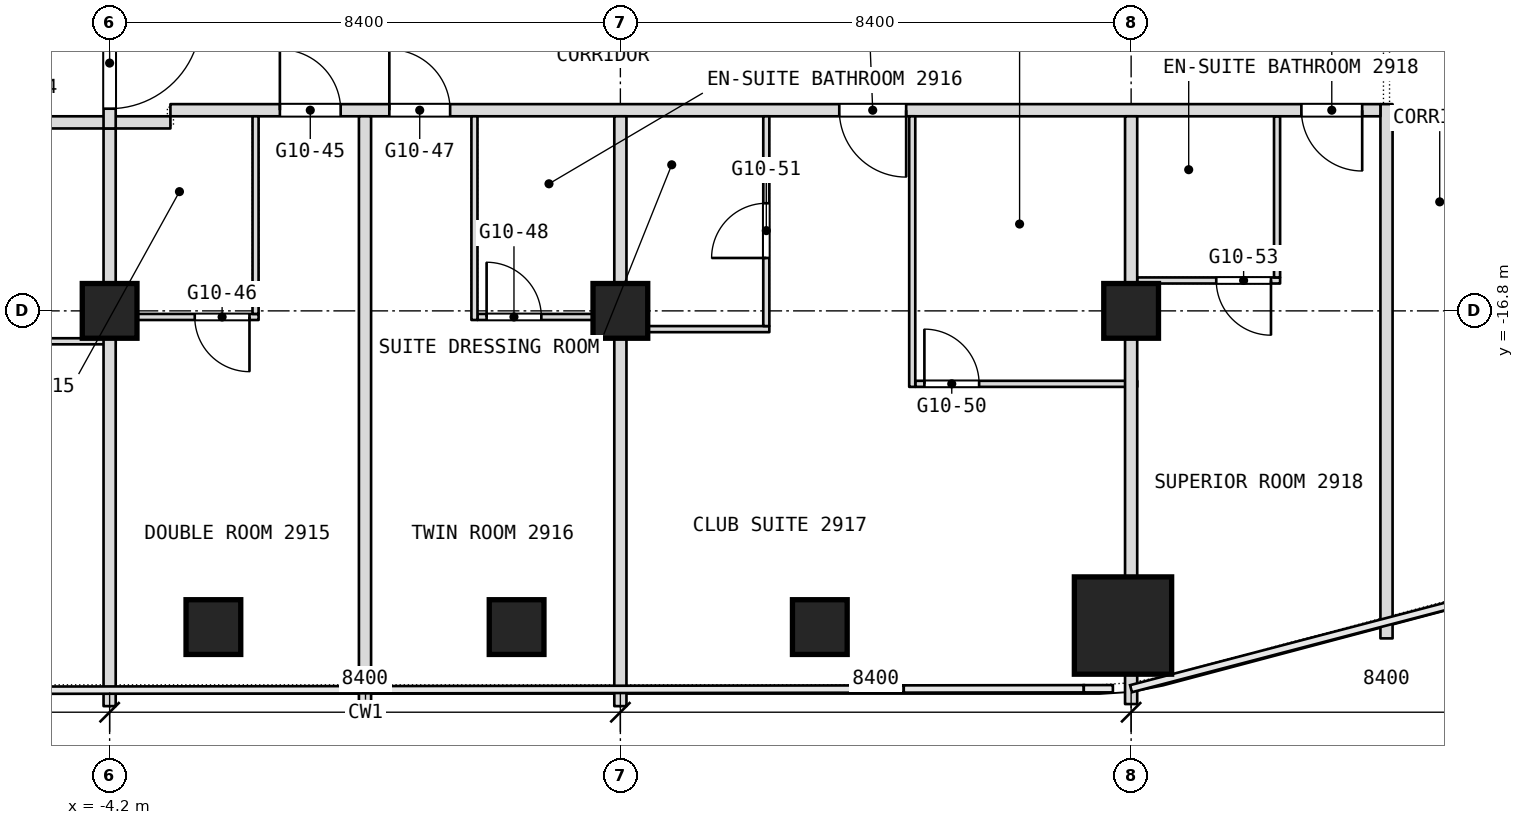
"""IFC4 building model, lengths in metres.
Left out: names, types, materials, properties, quantities, classifications, styles, units other than length and angle.
Written with IfcOpenShell. Run it as: python <this file> out.ifc"""

import sys

from ifc_helpers import new_model, si_unit, direction, frame, frame_2d, origin, origin_2d, place, context, subcontext, project, spatial, rectangle, extrude, element, fill, save


model = new_model("IFC4")
c1 = context("Model", 3, precision=1e-05, world=origin(), true_north=direction((0.0, 1.0)))
c2 = subcontext(c1, "Body", "Model", "MODEL_VIEW")
j1 = project(units=[si_unit("LENGTHUNIT", "METRE"), si_unit("PLANEANGLEUNIT", "RADIAN")], contexts=[c1])
p1 = place(None, origin())
s1 = spatial("IfcSite", under=j1, at=p1, CompositionType="ELEMENT")
p2 = place(p1, origin())
s2 = spatial("IfcBuilding", under=s1, at=p2, CompositionType="ELEMENT")
p3 = place(p2, frame((0.0, 0.0, 130.1)))
s3 = spatial("IfcBuildingStorey", under=s2, at=p3, CompositionType="ELEMENT", Elevation=130.1)
p4 = place(p3, frame((12.466, -21.975, 0.0), z_axis=(0.0, 0.0, 1.0), x_axis=(1.0, 0.0, 0.0)))
e1 = element("IfcColumn", 1, at=p4, inside=s3, PredefinedType="COLUMN", context=c2, shape_type="SweptSolid", body=[
    extrude(rectangle(XDim=1.6, YDim=1.6, at=origin_2d()), origin(), (0.0, 0.0, 1.0), 3.6),
])
for number, where, z_axis, x_axis in (
    (2, (-4.2, -16.8, 0.0), (0.0, 0.0, 1.0), (1.0, 0.0, 0.0)),
    (3, (4.2, -16.8, 0.0), (0.0, 0.0, 1.0), (1.0, 0.0, 0.0)),
    (4, (12.6, -16.8, 0.0), (0.0, 0.0, 1.0), (1.0, 0.0, 0.0)),
    (5, (7.48, -22.0, 0.0), (0.0, 0.0, 1.0), (1.0, 0.0, 0.0)),
    (6, (2.493, -22.0, 0.0), (0.0, 0.0, 1.0), (1.0, 0.0, 0.0)),
    (7, (-2.493, -22.0, 0.0), (0.0, 0.0, 1.0), (1.0, 0.0, 0.0)),
):
    element("IfcColumn", number, at=place(p3, frame(where, z_axis=z_axis, x_axis=x_axis)), inside=s3, PredefinedType="COLUMN", context=c2, shape_type="SweptSolid", body=[
        extrude(rectangle(XDim=0.9, YDim=0.9, at=origin_2d()), origin(), (0.0, 0.0, 1.0), 3.6),
    ])
p5 = place(p3, frame((9.05, -18.0, 0.0), z_axis=(0.0, 0.0, 1.0), x_axis=(1.0, 0.0, 0.0)))
e8 = element("IfcWall", 8, at=p5, inside=s3, PredefinedType="PARTITIONING", context=c2, shape_type="SweptSolid", body=[
    extrude(rectangle(XDim=3.65, YDim=0.1, at=frame_2d((1.825, 0.0))), origin(), (0.0, 0.0, 1.0), 3.34),
])
p6 = place(p5, frame((0.15, 0.0, 0.0)))
e9 = element("IfcOpeningElement", 9, at=p6, cuts=e8, PredefinedType="OPENING", context=c2, shape_type="SweptSolid", body=[
    extrude(rectangle(XDim=0.9, YDim=2.1, at=frame_2d((0.45, 1.05))), frame((0.0, 0.05, 0.0), z_axis=(0.0, -1.0, 0.0), x_axis=(1.0, 0.0, 0.0)), (0.0, 0.0, 1.0), 0.1),
])
p7 = place(p3, frame((-7.75, -17.3, 0.0), z_axis=(0.0, 0.0, 1.0), x_axis=(1.0, 0.0, 0.0)))
e10 = element("IfcWall", 10, at=p7, inside=s3, PredefinedType="PARTITIONING", context=c2, shape_type="SweptSolid", body=[
    extrude(rectangle(XDim=3.65, YDim=0.1, at=frame_2d((1.825, 0.0))), origin(), (0.0, 0.0, 1.0), 3.34),
])
p8 = place(p7, frame((0.15, 0.0, 0.0)))
e11 = element("IfcOpeningElement", 11, at=p8, cuts=e10, PredefinedType="OPENING", context=c2, shape_type="SweptSolid", body=[
    extrude(rectangle(XDim=0.9, YDim=2.1, at=frame_2d((0.45, 1.05))), frame((0.0, 0.05, 0.0), z_axis=(0.0, -1.0, 0.0), x_axis=(1.0, 0.0, 0.0)), (0.0, 0.0, 1.0), 0.1),
])
p9 = place(p3, frame((4.3, -17.1, 0.0), z_axis=(0.0, 0.0, 1.0), x_axis=(1.0, 0.0, 0.0)))
e12 = element("IfcWall", 12, at=p9, inside=s3, PredefinedType="PARTITIONING", context=c2, shape_type="SweptSolid", body=[
    extrude(rectangle(XDim=2.35, YDim=0.1, at=frame_2d((1.175, 0.0))), origin(), (0.0, 0.0, 1.0), 3.34),
])
p10 = place(p3, frame((-4.1, -16.9, 0.0), z_axis=(0.0, 0.0, 1.0), x_axis=(1.0, 0.0, 0.0)))
e13 = element("IfcWall", 13, at=p10, inside=s3, PredefinedType="PARTITIONING", context=c2, shape_type="SweptSolid", body=[
    extrude(rectangle(XDim=2.35, YDim=0.1, at=frame_2d((1.175, 0.0))), origin(), (0.0, 0.0, 1.0), 2.89),
])
p11 = place(p10, frame((1.3, 0.0, 0.0)))
e14 = element("IfcOpeningElement", 14, at=p11, cuts=e13, PredefinedType="OPENING", context=c2, shape_type="SweptSolid", body=[
    extrude(rectangle(XDim=0.9, YDim=2.1, at=frame_2d((0.45, 1.05))), frame((0.0, 0.05, 0.0), z_axis=(0.0, -1.0, 0.0), x_axis=(1.0, 0.0, 0.0)), (0.0, 0.0, 1.0), 0.1),
])
p12 = place(p3, frame((1.85, -16.9, 0.0), z_axis=(0.0, 0.0, 1.0), x_axis=(1.0, 0.0, 0.0)))
e15 = element("IfcWall", 15, at=p12, inside=s3, PredefinedType="PARTITIONING", context=c2, shape_type="SweptSolid", body=[
    extrude(rectangle(XDim=2.45, YDim=0.1, at=frame_2d((1.225, 0.0))), origin(), (0.0, 0.0, 1.0), 2.89),
])
p13 = place(p12, frame((0.15, 0.0, 0.0)))
e16 = element("IfcOpeningElement", 16, at=p13, cuts=e15, PredefinedType="OPENING", context=c2, shape_type="SweptSolid", body=[
    extrude(rectangle(XDim=0.9, YDim=2.1, at=frame_2d((0.45, 1.05))), frame((0.0, 0.05, 0.0), z_axis=(0.0, -1.0, 0.0), x_axis=(1.0, 0.0, 0.0)), (0.0, 0.0, 1.0), 0.1),
])
p14 = place(p3, frame((16.8, -22.186, 0.0), z_axis=(0.0, 0.0, 1.0), x_axis=(0.0, 1.0, 0.0)))
e17 = element("IfcWall", 17, at=p14, inside=s3, PredefinedType="PARTITIONING", context=c2, shape_type="SweptSolid", body=[
    extrude(rectangle(XDim=8.786, YDim=0.2, at=frame_2d((4.393, 0.0))), origin(), (0.0, 0.0, 1.0), 3.34),
])
p15 = place(p3, frame((12.7, -16.3, 0.0), z_axis=(0.0, 0.0, 1.0), x_axis=(1.0, 0.0, 0.0)))
e18 = element("IfcWall", 18, at=p15, inside=s3, PredefinedType="PARTITIONING", context=c2, shape_type="SweptSolid", body=[
    extrude(rectangle(XDim=2.35, YDim=0.1, at=frame_2d((1.175, 0.0))), origin(), (0.0, 0.0, 1.0), 3.34),
])
p16 = place(p15, frame((1.3, 0.0, 0.0)))
e19 = element("IfcOpeningElement", 19, at=p16, cuts=e18, PredefinedType="OPENING", context=c2, shape_type="SweptSolid", body=[
    extrude(rectangle(XDim=0.9, YDim=2.1, at=frame_2d((0.45, 1.05))), frame((0.0, 0.05, 0.0), z_axis=(0.0, -1.0, 0.0), x_axis=(1.0, 0.0, 0.0)), (0.0, 0.0, 1.0), 0.1),
])
p17 = place(p3, frame((15.0, -16.25, 0.0), z_axis=(0.0, 0.0, 1.0), x_axis=(0.0, 1.0, 0.0)))
e20 = element("IfcWall", 20, at=p17, inside=s3, PredefinedType="PARTITIONING", context=c2, shape_type="SweptSolid", body=[
    extrude(rectangle(XDim=2.65, YDim=0.1, at=frame_2d((1.325, 0.0))), origin(), (0.0, 0.0, 1.0), 3.34),
])
p18 = place(p3, frame((-12.4, -13.7, 0.0), z_axis=(0.0, 0.0, 1.0), x_axis=(1.0, 0.0, 0.0)))
e21 = element("IfcWall", 21, at=p18, inside=s3, PredefinedType="PARTITIONING", context=c2, shape_type="SweptSolid", body=[
    extrude(rectangle(XDim=9.2, YDim=0.2, at=frame_2d((4.6, 0.0))), origin(), (0.0, 0.0, 1.0), 3.34),
])
p19 = place(p18, frame((3.4, 0.0, 0.0)))
e22 = element("IfcOpeningElement", 22, at=p19, cuts=e21, PredefinedType="OPENING", context=c2, shape_type="SweptSolid", body=[
    extrude(rectangle(XDim=1.1, YDim=2.1, at=frame_2d((0.55, 1.05))), frame((0.0, 0.1, 0.0), z_axis=(0.0, -1.0, 0.0), x_axis=(1.0, 0.0, 0.0)), (0.0, 0.0, 1.0), 0.2),
])
p20 = place(p3, frame((-3.2, -13.5, 0.0), z_axis=(0.0, 0.0, 1.0), x_axis=(1.0, 0.0, 0.0)))
e23 = element("IfcWall", 23, at=p20, inside=s3, PredefinedType="PARTITIONING", context=c2, shape_type="SweptSolid", body=[
    extrude(rectangle(XDim=19.9, YDim=0.2, at=frame_2d((9.95, 0.0))), origin(), (0.0, 0.0, 1.0), 3.34),
])
p21 = place(p20, frame((1.8, 0.0, 0.0)))
e24 = element("IfcOpeningElement", 24, at=p21, cuts=e23, PredefinedType="OPENING", context=c2, shape_type="SweptSolid", body=[
    extrude(rectangle(XDim=1.0, YDim=2.1, at=frame_2d((0.5, 1.05))), frame((0.0, 0.1, 0.0), z_axis=(0.0, -1.0, 0.0), x_axis=(1.0, 0.0, 0.0)), (0.0, 0.0, 1.0), 0.2),
])
p22 = place(p20, frame((3.6, 0.0, 0.0)))
e25 = element("IfcOpeningElement", 25, at=p22, cuts=e23, PredefinedType="OPENING", context=c2, shape_type="SweptSolid", body=[
    extrude(rectangle(XDim=1.0, YDim=2.1, at=frame_2d((0.5, 1.05))), frame((0.0, 0.1, 0.0), z_axis=(0.0, -1.0, 0.0), x_axis=(1.0, 0.0, 0.0)), (0.0, 0.0, 1.0), 0.2),
])
p23 = place(p20, frame((11.0, 0.0, 0.0)))
e26 = element("IfcOpeningElement", 26, at=p23, cuts=e23, PredefinedType="OPENING", context=c2, shape_type="SweptSolid", body=[
    extrude(rectangle(XDim=1.1, YDim=2.1, at=frame_2d((0.55, 1.05))), frame((0.0, 0.1, 0.0), z_axis=(0.0, -1.0, 0.0), x_axis=(1.0, 0.0, 0.0)), (0.0, 0.0, 1.0), 0.2),
])
p24 = place(p20, frame((18.6, 0.0, 0.0)))
e27 = element("IfcOpeningElement", 27, at=p24, cuts=e23, PredefinedType="OPENING", context=c2, shape_type="SweptSolid", body=[
    extrude(rectangle(XDim=1.0, YDim=2.1, at=frame_2d((0.5, 1.05))), frame((0.0, 0.1, 0.0), z_axis=(0.0, -1.0, 0.0), x_axis=(1.0, 0.0, 0.0)), (0.0, 0.0, 1.0), 0.2),
])
p25 = place(p3, frame((12.6, -23.266, 0.0), z_axis=(0.0, 0.0, 1.0), x_axis=(0.0, 1.0, 0.0)))
e28 = element("IfcWall", 28, at=p25, inside=s3, PredefinedType="PARTITIONING", context=c2, shape_type="SweptSolid", body=[
    extrude(rectangle(XDim=0.491, YDim=0.2, at=frame_2d((0.246, 0.0))), origin(), (0.0, 0.0, 1.0), 3.34),
])
p26 = place(p3, frame((12.6, -21.175, 0.0), z_axis=(0.0, 0.0, 1.0), x_axis=(0.0, 1.0, 0.0)))
e29 = element("IfcWall", 29, at=p26, inside=s3, PredefinedType="PARTITIONING", context=c2, shape_type="SweptSolid", body=[
    extrude(rectangle(XDim=7.575, YDim=0.2, at=frame_2d((3.788, 0.0))), origin(), (0.0, 0.0, 1.0), 3.34),
])
p27 = place(p3, frame((9.0, -18.05, 0.0), z_axis=(0.0, 0.0, 1.0), x_axis=(0.0, 1.0, 0.0)))
e30 = element("IfcWall", 30, at=p27, inside=s3, PredefinedType="PARTITIONING", context=c2, shape_type="SweptSolid", body=[
    extrude(rectangle(XDim=4.45, YDim=0.1, at=frame_2d((2.225, 0.0))), origin(), (0.0, 0.0, 1.0), 3.34),
])
p28 = place(p3, frame((6.6, -17.05, 0.0), z_axis=(0.0, 0.0, 1.0), x_axis=(0.0, 1.0, 0.0)))
e31 = element("IfcWall", 31, at=p28, inside=s3, PredefinedType="PARTITIONING", context=c2, shape_type="SweptSolid", body=[
    extrude(rectangle(XDim=3.45, YDim=0.1, at=frame_2d((1.725, 0.0))), origin(), (0.0, 0.0, 1.0), 3.34),
])
p29 = place(p28, frame((1.12, 0.0, 0.0)))
e32 = element("IfcOpeningElement", 32, at=p29, cuts=e31, PredefinedType="OPENING", context=c2, shape_type="SweptSolid", body=[
    extrude(rectangle(XDim=0.9, YDim=2.1, at=frame_2d((0.45, 1.05))), frame((0.0, 0.05, 0.0), z_axis=(0.0, -1.0, 0.0), x_axis=(1.0, 0.0, 0.0)), (0.0, 0.0, 1.0), 0.1),
])
p30 = place(p3, frame((4.2, -23.3, 0.0), z_axis=(0.0, 0.0, 1.0), x_axis=(0.0, 1.0, 0.0)))
e33 = element("IfcWall", 33, at=p30, inside=s3, PredefinedType="PARTITIONING", context=c2, shape_type="SweptSolid", body=[
    extrude(rectangle(XDim=9.7, YDim=0.2, at=frame_2d((4.85, 0.0))), origin(), (0.0, 0.0, 1.0), 3.34),
])
p31 = place(p3, frame((1.8, -16.95, 0.0), z_axis=(0.0, 0.0, 1.0), x_axis=(0.0, 1.0, 0.0)))
e34 = element("IfcWall", 34, at=p31, inside=s3, PredefinedType="PARTITIONING", context=c2, shape_type="SweptSolid", body=[
    extrude(rectangle(XDim=3.35, YDim=0.1, at=frame_2d((1.675, 0.0))), origin(), (0.0, 0.0, 1.0), 3.34),
])
p32 = place(p3, frame((0.0, -23.3, 0.0), z_axis=(0.0, 0.0, 1.0), x_axis=(0.0, 1.0, 0.0)))
e35 = element("IfcWall", 35, at=p32, inside=s3, PredefinedType="PARTITIONING", context=c2, shape_type="SweptSolid", body=[
    extrude(rectangle(XDim=9.7, YDim=0.2, at=frame_2d((4.85, 0.0))), origin(), (0.0, 0.0, 1.0), 3.34),
])
p33 = place(p3, frame((-1.8, -16.85, 0.0), z_axis=(0.0, 0.0, 1.0), x_axis=(0.0, 1.0, 0.0)))
e36 = element("IfcWall", 36, at=p33, inside=s3, PredefinedType="PARTITIONING", context=c2, shape_type="SweptSolid", body=[
    extrude(rectangle(XDim=3.25, YDim=0.1, at=frame_2d((1.625, 0.0))), origin(), (0.0, 0.0, 1.0), 3.34),
])
p34 = place(p3, frame((-4.2, -23.3, 0.0), z_axis=(0.0, 0.0, 1.0), x_axis=(0.0, 1.0, 0.0)))
e37 = element("IfcWall", 37, at=p34, inside=s3, PredefinedType="PARTITIONING", context=c2, shape_type="SweptSolid", body=[
    extrude(rectangle(XDim=9.5, YDim=0.2, at=frame_2d((4.75, 0.0))), origin(), (0.0, 0.0, 1.0), 3.34),
])
p35 = place(p3, frame((-4.2, -13.8, 0.0), z_axis=(0.0, 0.0, 1.0), x_axis=(0.0, 1.0, 0.0)))
e38 = element("IfcWall", 38, at=p35, inside=s3, PredefinedType="PARTITIONING", context=c2, shape_type="SweptSolid", body=[
    extrude(rectangle(XDim=13.8, YDim=0.2, at=frame_2d((6.9, 0.0))), origin(), (0.0, 0.0, 1.0), 3.34),
])
p36 = place(p35, frame((12.15, 0.0, 0.0)))
e39 = element("IfcOpeningElement", 39, at=p36, cuts=e38, PredefinedType="OPENING", context=c2, shape_type="SweptSolid", body=[
    extrude(rectangle(XDim=1.5, YDim=2.1, at=frame_2d((0.75, 1.05))), frame((0.0, 0.1, 0.0), z_axis=(0.0, -1.0, 0.0), x_axis=(1.0, 0.0, 0.0)), (0.0, 0.0, 1.0), 0.2),
])
p37 = place(p35, frame((0.325, 0.0, 0.0)))
e40 = element("IfcOpeningElement", 40, at=p37, cuts=e38, PredefinedType="OPENING", context=c2, shape_type="SweptSolid", body=[
    extrude(rectangle(XDim=1.5, YDim=2.1, at=frame_2d((0.75, 1.05))), frame((0.0, 0.1, 0.0), z_axis=(0.0, -1.0, 0.0), x_axis=(1.0, 0.0, 0.0)), (0.0, 0.0, 1.0), 0.2),
])
p38 = place(p6, origin())
e41 = element("IfcDoor", 41, at=p38, inside=s3, OperationType="SINGLE_SWING_LEFT", PredefinedType="DOOR", context=c2, shape_type="SweptSolid", body=[
    extrude(rectangle(XDim=0.9, YDim=2.1, at=frame_2d((0.45, 1.05))), frame((0.0, 0.025, 0.0), z_axis=(0.0, -1.0, 0.0), x_axis=(1.0, 0.0, 0.0)), (0.0, 0.0, 1.0), 0.05),
])
fill(e9, e41)
p39 = place(p11, origin())
e42 = element("IfcDoor", 42, at=p39, inside=s3, OperationType="SINGLE_SWING_RIGHT", PredefinedType="DOOR", context=c2, shape_type="SweptSolid", body=[
    extrude(rectangle(XDim=0.9, YDim=2.1, at=frame_2d((0.45, 1.05))), frame((0.0, 0.025, 0.0), z_axis=(0.0, -1.0, 0.0), x_axis=(1.0, 0.0, 0.0)), (0.0, 0.0, 1.0), 0.05),
])
fill(e14, e42)
p40 = place(p13, origin())
e43 = element("IfcDoor", 43, at=p40, inside=s3, OperationType="SINGLE_SWING_LEFT", PredefinedType="DOOR", context=c2, shape_type="SweptSolid", body=[
    extrude(rectangle(XDim=0.9, YDim=2.1, at=frame_2d((0.45, 1.05))), frame((0.0, 0.025, 0.0), z_axis=(0.0, -1.0, 0.0), x_axis=(1.0, 0.0, 0.0)), (0.0, 0.0, 1.0), 0.05),
])
fill(e16, e43)
p41 = place(p16, origin())
e44 = element("IfcDoor", 44, at=p41, inside=s3, OperationType="SINGLE_SWING_RIGHT", PredefinedType="DOOR", context=c2, shape_type="SweptSolid", body=[
    extrude(rectangle(XDim=0.9, YDim=2.1, at=frame_2d((0.45, 1.05))), frame((0.0, 0.025, 0.0), z_axis=(0.0, -1.0, 0.0), x_axis=(1.0, 0.0, 0.0)), (0.0, 0.0, 1.0), 0.05),
])
fill(e19, e44)
p42 = place(p21, origin())
e45 = element("IfcDoor", 45, at=p42, inside=s3, OperationType="SINGLE_SWING_LEFT", PredefinedType="DOOR", context=c2, shape_type="SweptSolid", body=[
    extrude(rectangle(XDim=1.0, YDim=2.1, at=frame_2d((0.5, 1.05))), frame((0.0, 0.025, 0.0), z_axis=(0.0, -1.0, 0.0), x_axis=(1.0, 0.0, 0.0)), (0.0, 0.0, 1.0), 0.05),
])
fill(e24, e45)
p43 = place(p22, origin())
e46 = element("IfcDoor", 46, at=p43, inside=s3, OperationType="SINGLE_SWING_LEFT", PredefinedType="DOOR", context=c2, shape_type="SweptSolid", body=[
    extrude(rectangle(XDim=1.0, YDim=2.1, at=frame_2d((0.5, 1.05))), frame((0.0, 0.025, 0.0), z_axis=(0.0, -1.0, 0.0), x_axis=(1.0, 0.0, 0.0)), (0.0, 0.0, 1.0), 0.05),
])
fill(e25, e46)
p44 = place(p23, origin())
e47 = element("IfcDoor", 47, at=p44, inside=s3, OperationType="SINGLE_SWING_LEFT", PredefinedType="DOOR", context=c2, shape_type="SweptSolid", body=[
    extrude(rectangle(XDim=1.1, YDim=2.1, at=frame_2d((0.55, 1.05))), frame((0.0, 0.025, 0.0), z_axis=(0.0, -1.0, 0.0), x_axis=(1.0, 0.0, 0.0)), (0.0, 0.0, 1.0), 0.05),
])
fill(e26, e47)
p45 = place(p24, origin())
e48 = element("IfcDoor", 48, at=p45, inside=s3, OperationType="SINGLE_SWING_LEFT", PredefinedType="DOOR", context=c2, shape_type="SweptSolid", body=[
    extrude(rectangle(XDim=1.0, YDim=2.1, at=frame_2d((0.5, 1.05))), frame((0.0, 0.025, 0.0), z_axis=(0.0, -1.0, 0.0), x_axis=(1.0, 0.0, 0.0)), (0.0, 0.0, 1.0), 0.05),
])
fill(e27, e48)
p46 = place(p29, origin())
e49 = element("IfcDoor", 49, at=p46, inside=s3, OperationType="SINGLE_SWING_LEFT", PredefinedType="DOOR", context=c2, shape_type="SweptSolid", body=[
    extrude(rectangle(XDim=0.9, YDim=2.1, at=frame_2d((0.45, 1.05))), frame((0.0, 0.025, 0.0), z_axis=(0.0, -1.0, 0.0), x_axis=(1.0, 0.0, 0.0)), (0.0, 0.0, 1.0), 0.05),
])
fill(e32, e49)
p47 = place(p37, origin())
e50 = element("IfcDoor", 50, at=p47, inside=s3, OperationType="DOUBLE_DOOR_DOUBLE_SWING", PredefinedType="DOOR", context=c2, shape_type="SweptSolid", body=[
    extrude(rectangle(XDim=1.5, YDim=2.1, at=frame_2d((0.75, 1.05))), frame((0.0, 0.025, 0.0), z_axis=(0.0, -1.0, 0.0), x_axis=(1.0, 0.0, 0.0)), (0.0, 0.0, 1.0), 0.05),
])
fill(e40, e50)
save(model, sys.argv[1])
